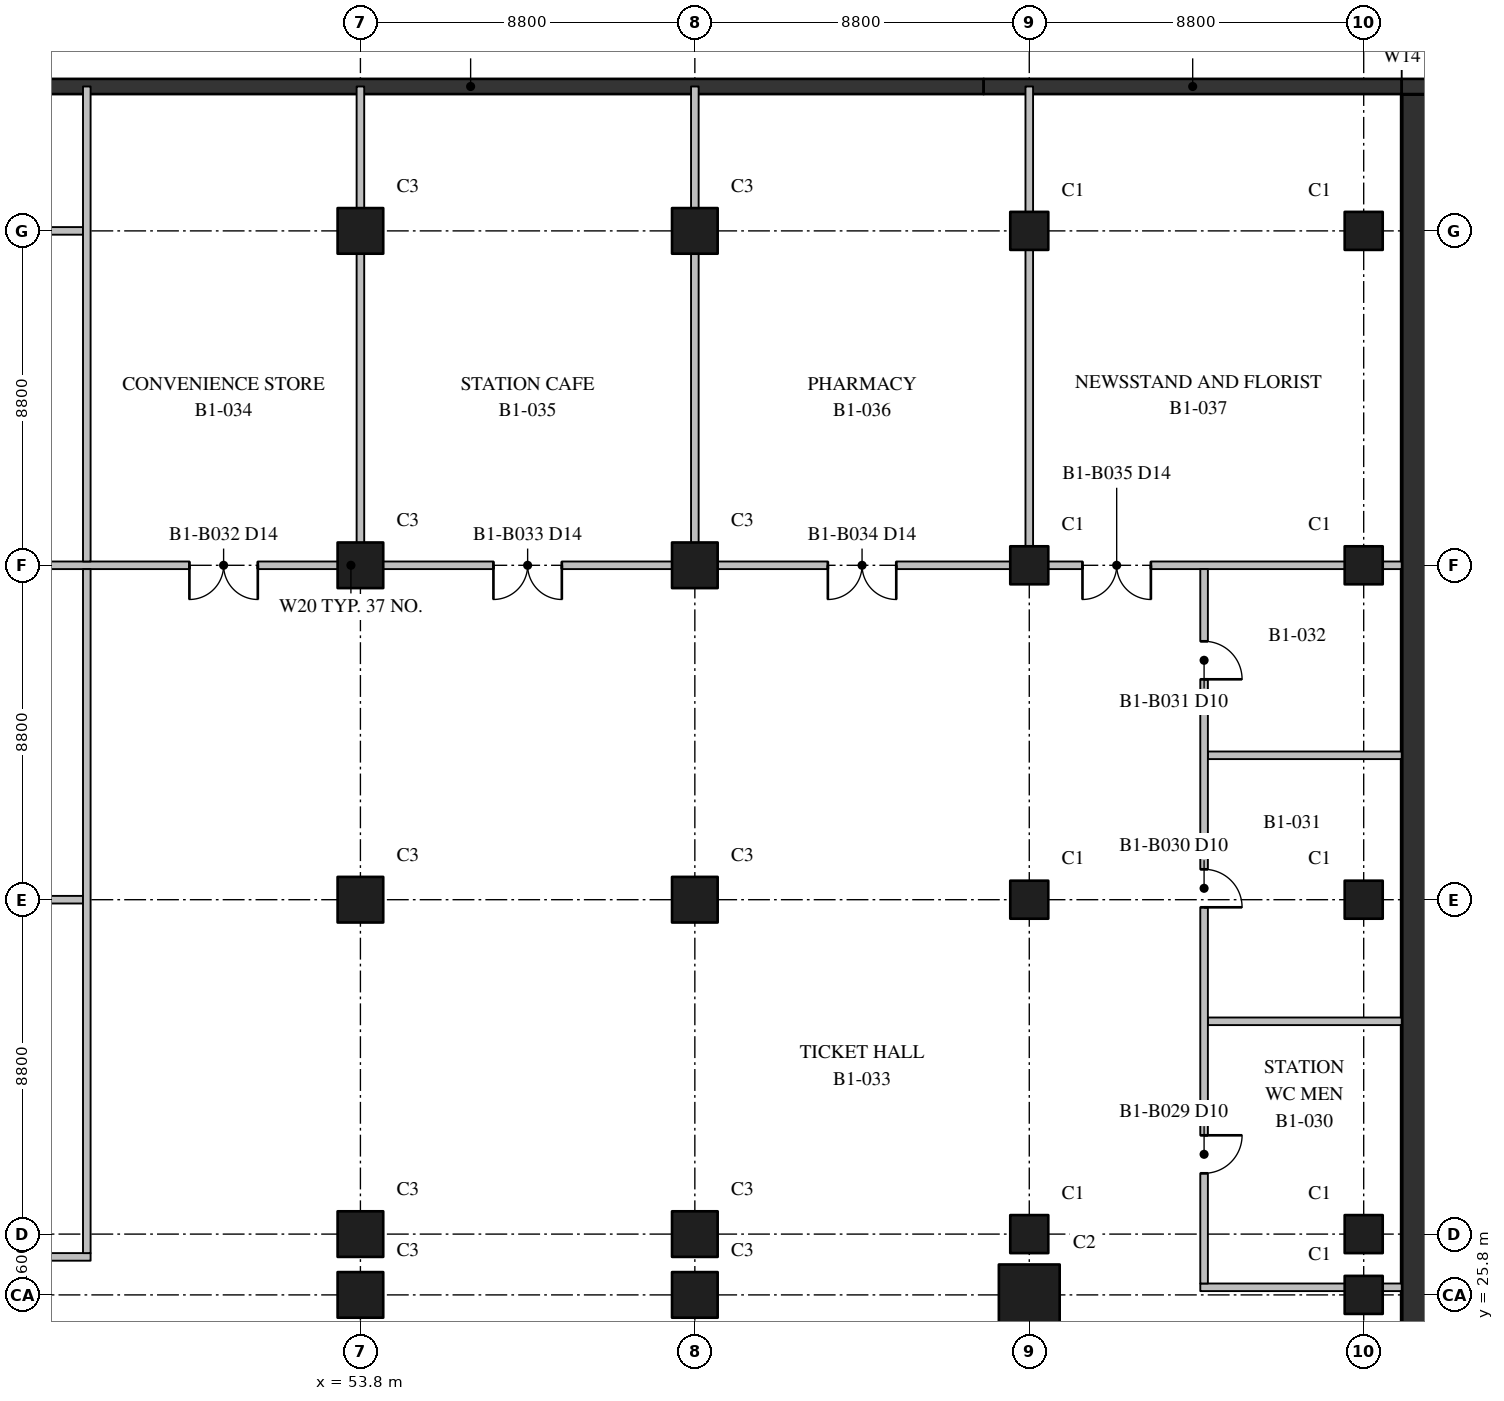
"""IFC4 building model, lengths in metres.
Left out: names, types, materials, properties, quantities, classifications, styles, units other than length and angle.
Written with IfcOpenShell. Run it as: python <this file> out.ifc"""

import sys

from ifc_helpers import new_model, si_unit, direction, frame, frame_2d, origin, origin_2d, place, context, subcontext, project, spatial, polyline, rectangle, outline, extrude, element, fill, save


model = new_model("IFC4")
c1 = context("Model", 3, precision=1e-05, world=origin(), true_north=direction((0.0, 1.0)))
c2 = subcontext(c1, "Body", "Model", "MODEL_VIEW")
j1 = project(units=[si_unit("LENGTHUNIT", "METRE"), si_unit("PLANEANGLEUNIT", "RADIAN")], contexts=[c1])
p1 = place(None, origin())
s1 = spatial("IfcSite", under=j1, at=p1, CompositionType="ELEMENT")
p2 = place(p1, origin())
s2 = spatial("IfcBuilding", under=s1, at=p2, CompositionType="ELEMENT")
p3 = place(p2, frame((0.0, 0.0, -7.0)))
s3 = spatial("IfcBuildingStorey", under=s2, at=p3, CompositionType="ELEMENT", Elevation=-7.0)
for number, where, z_axis, x_axis in (
    (1, (53.8, 25.8, 0.0), (0.0, 0.0, 1.0), (1.0, 0.0, 0.0)),
    (2, (53.8, 27.4, 0.0), (0.0, 0.0, 1.0), (1.0, 0.0, 0.0)),
    (3, (53.8, 36.2, 0.0), (0.0, 0.0, 1.0), (1.0, 0.0, 0.0)),
    (4, (53.8, 45.0, 0.0), (0.0, 0.0, 1.0), (1.0, 0.0, 0.0)),
    (5, (53.8, 53.8, 0.0), (0.0, 0.0, 1.0), (1.0, 0.0, 0.0)),
    (6, (62.6, 25.8, 0.0), (0.0, 0.0, 1.0), (1.0, 0.0, 0.0)),
    (7, (62.6, 27.4, 0.0), (0.0, 0.0, 1.0), (1.0, 0.0, 0.0)),
    (8, (62.6, 36.2, 0.0), (0.0, 0.0, 1.0), (1.0, 0.0, 0.0)),
    (9, (62.6, 45.0, 0.0), (0.0, 0.0, 1.0), (1.0, 0.0, 0.0)),
    (10, (62.6, 53.8, 0.0), (0.0, 0.0, 1.0), (1.0, 0.0, 0.0)),
):
    element("IfcColumn", number, at=place(p3, frame(where, z_axis=z_axis, x_axis=x_axis)), inside=s3, PredefinedType="COLUMN", context=c2, shape_type="SweptSolid", body=[
        extrude(rectangle(XDim=1.2, YDim=1.2, at=origin_2d()), origin(), (0.0, 0.0, 1.0), 7.0),
    ])
p4 = place(p3, frame((71.4, 25.8, 0.0), z_axis=(0.0, 0.0, 1.0), x_axis=(1.0, 0.0, 0.0)))
e11 = element("IfcColumn", 11, at=p4, inside=s3, PredefinedType="COLUMN", context=c2, shape_type="SweptSolid", body=[
    extrude(rectangle(XDim=1.6, YDim=1.6, at=origin_2d()), origin(), (0.0, 0.0, 1.0), 7.0),
])
for number, where, z_axis, x_axis in (
    (12, (71.4, 27.4, 0.0), (0.0, 0.0, 1.0), (1.0, 0.0, 0.0)),
    (13, (71.4, 36.2, 0.0), (0.0, 0.0, 1.0), (1.0, 0.0, 0.0)),
    (14, (71.4, 45.0, 0.0), (0.0, 0.0, 1.0), (1.0, 0.0, 0.0)),
    (15, (71.4, 53.8, 0.0), (0.0, 0.0, 1.0), (1.0, 0.0, 0.0)),
    (16, (80.2, 25.8, 0.0), (0.0, 0.0, 1.0), (1.0, 0.0, 0.0)),
    (17, (80.2, 27.4, 0.0), (0.0, 0.0, 1.0), (1.0, 0.0, 0.0)),
    (18, (80.2, 36.2, 0.0), (0.0, 0.0, 1.0), (1.0, 0.0, 0.0)),
    (19, (80.2, 45.0, 0.0), (0.0, 0.0, 1.0), (1.0, 0.0, 0.0)),
    (20, (80.2, 53.8, 0.0), (0.0, 0.0, 1.0), (1.0, 0.0, 0.0)),
):
    element("IfcColumn", number, at=place(p3, frame(where, z_axis=z_axis, x_axis=x_axis)), inside=s3, PredefinedType="COLUMN", context=c2, shape_type="SweptSolid", body=[
        extrude(rectangle(XDim=1.0, YDim=1.0, at=origin_2d()), origin(), (0.0, 0.0, 1.0), 7.0),
    ])
p5 = place(p3, frame((43.2, 57.6, 0.0), z_axis=(0.0, 0.0, 1.0), x_axis=(1.0, 0.0, 0.0)))
e21 = element("IfcWall", 21, at=p5, inside=s3, PredefinedType="SHEAR", context=c2, shape_type="SweptSolid", body=[
    extrude(outline(polyline([(0.0, 0.0), (27.0, 0.0), (27.0, 4.15), (24.3, 3.7), (21.6, 3.25), (18.9, 2.8), (16.2, 2.35), (13.5, 1.9), (10.8, 1.45), (8.1, 1.0), (5.4, 0.55), (2.7, 0.1), (0.0, 0.05), (0.0, 0.0)])), frame((0.0, 0.2, 0.0), z_axis=(0.0, -1.0, 0.0), x_axis=(1.0, 0.0, 0.0)), (0.0, 0.0, 1.0), 0.4),
])
p6 = place(p3, frame((70.2, 57.6, 0.0), z_axis=(0.0, 0.0, 1.0), x_axis=(1.0, 0.0, 0.0)))
e22 = element("IfcWall", 22, at=p6, inside=s3, PredefinedType="SHEAR", context=c2, shape_type="SweptSolid", body=[
    extrude(outline(polyline([(0.0, 0.0), (11.0, 0.0), (11.0, 8.1), (8.25, 8.1), (5.5, 8.1), (2.75, 8.1), (0.0, 8.1), (0.0, 0.0)])), frame((0.0, 0.2, 0.0), z_axis=(0.0, -1.0, 0.0), x_axis=(1.0, 0.0, 0.0)), (0.0, 0.0, 1.0), 0.4),
])
p7 = place(p3, frame((81.2, 57.6, 5.2), z_axis=(0.0, 0.0, 1.0), x_axis=(1.0, 0.0, 0.0)))
e23 = element("IfcWall", 23, at=p7, inside=s3, PredefinedType="SHEAR", context=c2, shape_type="SweptSolid", body=[
    extrude(outline(polyline([(0.0, 0.0), (4.0, 0.0), (4.0, 2.9), (2.0, 2.9), (0.0, 2.9), (0.0, 0.0)])), frame((0.0, 0.2, 0.0), z_axis=(0.0, -1.0, 0.0), x_axis=(1.0, 0.0, 0.0)), (0.0, 0.0, 1.0), 0.4),
])
p8 = place(p3, frame((81.6, 57.4, 0.0), z_axis=(0.0, 0.0, 1.0), x_axis=(0.0, -1.0, 0.0)))
e24 = element("IfcWall", 24, at=p8, inside=s3, PredefinedType="SHEAR", context=c2, shape_type="SweptSolid", body=[
    extrude(rectangle(XDim=55.6, YDim=0.8, at=frame_2d((27.8, 0.0))), origin(), (0.0, 0.0, 1.0), 7.0),
])
p9 = place(p3, frame((76.1, 33.0, 0.0), z_axis=(0.0, 0.0, 1.0), x_axis=(1.0, 0.0, 0.0)))
e25 = element("IfcWall", 25, at=p9, inside=s3, PredefinedType="PARTITIONING", context=c2, shape_type="SweptSolid", body=[
    extrude(rectangle(XDim=5.1, YDim=0.2, at=frame_2d((2.55, 0.0))), origin(), (0.0, 0.0, 1.0), 6.5),
])
p10 = place(p3, frame((75.9, 26.0, 0.0), z_axis=(0.0, 0.0, 1.0), x_axis=(1.0, 0.0, 0.0)))
e26 = element("IfcWall", 26, at=p10, inside=s3, PredefinedType="PARTITIONING", context=c2, shape_type="SweptSolid", body=[
    extrude(rectangle(XDim=5.3, YDim=0.2, at=frame_2d((2.65, 0.0))), origin(), (0.0, 0.0, 1.0), 6.5),
])
p11 = place(p3, frame((76.1, 40.0, 0.0), z_axis=(0.0, 0.0, 1.0), x_axis=(1.0, 0.0, 0.0)))
e27 = element("IfcWall", 27, at=p11, inside=s3, PredefinedType="PARTITIONING", context=c2, shape_type="SweptSolid", body=[
    extrude(rectangle(XDim=5.1, YDim=0.2, at=frame_2d((2.55, 0.0))), origin(), (0.0, 0.0, 1.0), 6.5),
])
p12 = place(p3, frame((25.9, 45.0, 0.0), z_axis=(0.0, 0.0, 1.0), x_axis=(1.0, 0.0, 0.0)))
e28 = element("IfcWall", 28, at=p12, inside=s3, PredefinedType="PARTITIONING", context=c2, shape_type="SweptSolid", body=[
    extrude(rectangle(XDim=55.3, YDim=0.2, at=frame_2d((27.65, 0.0))), origin(), (0.0, 0.0, 1.0), 6.5),
])
p13 = place(p12, frame((23.4, 0.0, 0.0)))
e29 = element("IfcOpeningElement", 29, at=p13, cuts=e28, PredefinedType="OPENING", context=c2, shape_type="SweptSolid", body=[
    extrude(rectangle(XDim=1.8, YDim=2.4, at=frame_2d((0.9, 1.2))), frame((0.0, 0.11, 0.0), z_axis=(0.0, -1.0, 0.0), x_axis=(1.0, 0.0, 0.0)), (0.0, 0.0, 1.0), 0.22),
])
p14 = place(p12, frame((31.4, 0.0, 0.0)))
e30 = element("IfcOpeningElement", 30, at=p14, cuts=e28, PredefinedType="OPENING", context=c2, shape_type="SweptSolid", body=[
    extrude(rectangle(XDim=1.8, YDim=2.4, at=frame_2d((0.9, 1.2))), frame((0.0, 0.11, 0.0), z_axis=(0.0, -1.0, 0.0), x_axis=(1.0, 0.0, 0.0)), (0.0, 0.0, 1.0), 0.22),
])
p15 = place(p12, frame((40.2, 0.0, 0.0)))
e31 = element("IfcOpeningElement", 31, at=p15, cuts=e28, PredefinedType="OPENING", context=c2, shape_type="SweptSolid", body=[
    extrude(rectangle(XDim=1.8, YDim=2.4, at=frame_2d((0.9, 1.2))), frame((0.0, 0.11, 0.0), z_axis=(0.0, -1.0, 0.0), x_axis=(1.0, 0.0, 0.0)), (0.0, 0.0, 1.0), 0.22),
])
p16 = place(p12, frame((46.9, 0.0, 0.0)))
e32 = element("IfcOpeningElement", 32, at=p16, cuts=e28, PredefinedType="OPENING", context=c2, shape_type="SweptSolid", body=[
    extrude(rectangle(XDim=1.8, YDim=2.4, at=frame_2d((0.9, 1.2))), frame((0.0, 0.11, 0.0), z_axis=(0.0, -1.0, 0.0), x_axis=(1.0, 0.0, 0.0)), (0.0, 0.0, 1.0), 0.22),
])
p17 = place(p3, frame((25.9, 26.8, 0.0), z_axis=(0.0, 0.0, 1.0), x_axis=(1.0, 0.0, 0.0)))
e33 = element("IfcWall", 33, at=p17, inside=s3, PredefinedType="PARTITIONING", context=c2, shape_type="SweptSolid", body=[
    extrude(rectangle(XDim=20.8, YDim=0.2, at=frame_2d((10.4, 0.0))), origin(), (0.0, 0.0, 1.0), 6.5),
])
for number, where, z_axis, x_axis in (
    (34, (25.9, 36.2, 0.0), (0.0, 0.0, 1.0), (1.0, 0.0, 0.0)),
    (35, (25.9, 53.8, 0.0), (0.0, 0.0, 1.0), (1.0, 0.0, 0.0)),
):
    element("IfcWall", number, at=place(p3, frame(where, z_axis=z_axis, x_axis=x_axis)), inside=s3, PredefinedType="PARTITIONING", context=c2, shape_type="SweptSolid", body=[
        extrude(rectangle(XDim=20.6, YDim=0.2, at=frame_2d((10.3, 0.0))), origin(), (0.0, 0.0, 1.0), 6.5),
    ])
p18 = place(p3, frame((76.0, 26.1, 0.0), z_axis=(0.0, 0.0, 1.0), x_axis=(0.0, 1.0, 0.0)))
e36 = element("IfcWall", 36, at=p18, inside=s3, PredefinedType="PARTITIONING", context=c2, shape_type="SweptSolid", body=[
    extrude(rectangle(XDim=18.8, YDim=0.2, at=frame_2d((9.4, 0.0))), origin(), (0.0, 0.0, 1.0), 6.5),
])
p19 = place(p18, frame((2.9, 0.0, 0.0)))
e37 = element("IfcOpeningElement", 37, at=p19, cuts=e36, PredefinedType="OPENING", context=c2, shape_type="SweptSolid", body=[
    extrude(rectangle(XDim=1.0, YDim=2.1, at=frame_2d((0.5, 1.05))), frame((0.0, 0.11, 0.0), z_axis=(0.0, -1.0, 0.0), x_axis=(1.0, 0.0, 0.0)), (0.0, 0.0, 1.0), 0.22),
])
p20 = place(p18, frame((9.9, 0.0, 0.0)))
e38 = element("IfcOpeningElement", 38, at=p20, cuts=e36, PredefinedType="OPENING", context=c2, shape_type="SweptSolid", body=[
    extrude(rectangle(XDim=1.0, YDim=2.1, at=frame_2d((0.5, 1.05))), frame((0.0, 0.11, 0.0), z_axis=(0.0, -1.0, 0.0), x_axis=(1.0, 0.0, 0.0)), (0.0, 0.0, 1.0), 0.22),
])
p21 = place(p18, frame((15.9, 0.0, 0.0)))
e39 = element("IfcOpeningElement", 39, at=p21, cuts=e36, PredefinedType="OPENING", context=c2, shape_type="SweptSolid", body=[
    extrude(rectangle(XDim=1.0, YDim=2.1, at=frame_2d((0.5, 1.05))), frame((0.0, 0.11, 0.0), z_axis=(0.0, -1.0, 0.0), x_axis=(1.0, 0.0, 0.0)), (0.0, 0.0, 1.0), 0.22),
])
p22 = place(p3, frame((46.6, 26.9, 0.0), z_axis=(0.0, 0.0, 1.0), x_axis=(0.0, 1.0, 0.0)))
e40 = element("IfcWall", 40, at=p22, inside=s3, PredefinedType="PARTITIONING", context=c2, shape_type="SweptSolid", body=[
    extrude(rectangle(XDim=18.0, YDim=0.2, at=frame_2d((9.0, 0.0))), origin(), (0.0, 0.0, 1.0), 6.5),
])
for number, where, z_axis, x_axis in (
    (41, (46.6, 45.1, 0.0), (0.0, 0.0, 1.0), (0.0, 1.0, 0.0)),
    (42, (53.8, 45.1, 0.0), (0.0, 0.0, 1.0), (0.0, 1.0, 0.0)),
    (43, (62.6, 45.1, 0.0), (0.0, 0.0, 1.0), (0.0, 1.0, 0.0)),
    (44, (71.4, 45.1, 0.0), (0.0, 0.0, 1.0), (0.0, 1.0, 0.0)),
):
    element("IfcWall", number, at=place(p3, frame(where, z_axis=z_axis, x_axis=x_axis)), inside=s3, PredefinedType="PARTITIONING", context=c2, shape_type="SweptSolid", body=[
        extrude(rectangle(XDim=12.5, YDim=0.2, at=frame_2d((6.25, 0.0))), origin(), (0.0, 0.0, 1.0), 6.5),
    ])
p23 = place(p19, frame((1.0, 0.0, 0.0), z_axis=(0.0, 0.0, 1.0), x_axis=(-1.0, 0.0, 0.0)))
e45 = element("IfcDoor", 45, at=p23, inside=s3, OperationType="SINGLE_SWING_RIGHT", PredefinedType="DOOR", context=c2, shape_type="SweptSolid", body=[
    extrude(rectangle(XDim=1.0, YDim=2.1, at=frame_2d((0.5, 1.05))), frame((0.0, 0.025, 0.0), z_axis=(0.0, -1.0, 0.0), x_axis=(1.0, 0.0, 0.0)), (0.0, 0.0, 1.0), 0.05),
])
fill(e37, e45)
p24 = place(p20, frame((1.0, 0.0, 0.0), z_axis=(0.0, 0.0, 1.0), x_axis=(-1.0, 0.0, 0.0)))
e46 = element("IfcDoor", 46, at=p24, inside=s3, OperationType="SINGLE_SWING_LEFT", PredefinedType="DOOR", context=c2, shape_type="SweptSolid", body=[
    extrude(rectangle(XDim=1.0, YDim=2.1, at=frame_2d((0.5, 1.05))), frame((0.0, 0.025, 0.0), z_axis=(0.0, -1.0, 0.0), x_axis=(1.0, 0.0, 0.0)), (0.0, 0.0, 1.0), 0.05),
])
fill(e38, e46)
p25 = place(p21, frame((1.0, 0.0, 0.0), z_axis=(0.0, 0.0, 1.0), x_axis=(-1.0, 0.0, 0.0)))
e47 = element("IfcDoor", 47, at=p25, inside=s3, OperationType="SINGLE_SWING_LEFT", PredefinedType="DOOR", context=c2, shape_type="SweptSolid", body=[
    extrude(rectangle(XDim=1.0, YDim=2.1, at=frame_2d((0.5, 1.05))), frame((0.0, 0.025, 0.0), z_axis=(0.0, -1.0, 0.0), x_axis=(1.0, 0.0, 0.0)), (0.0, 0.0, 1.0), 0.05),
])
fill(e39, e47)
p26 = place(p13, frame((1.8, 0.0, 0.0), z_axis=(0.0, 0.0, 1.0), x_axis=(-1.0, 0.0, 0.0)))
e48 = element("IfcDoor", 48, at=p26, inside=s3, OperationType="DOUBLE_DOOR_SINGLE_SWING", PredefinedType="DOOR", context=c2, shape_type="SweptSolid", body=[
    extrude(rectangle(XDim=1.8, YDim=2.4, at=frame_2d((0.9, 1.2))), frame((0.0, 0.025, 0.0), z_axis=(0.0, -1.0, 0.0), x_axis=(1.0, 0.0, 0.0)), (0.0, 0.0, 1.0), 0.05),
])
fill(e29, e48)
p27 = place(p14, frame((1.8, 0.0, 0.0), z_axis=(0.0, 0.0, 1.0), x_axis=(-1.0, 0.0, 0.0)))
e49 = element("IfcDoor", 49, at=p27, inside=s3, OperationType="DOUBLE_DOOR_SINGLE_SWING", PredefinedType="DOOR", context=c2, shape_type="SweptSolid", body=[
    extrude(rectangle(XDim=1.8, YDim=2.4, at=frame_2d((0.9, 1.2))), frame((0.0, 0.025, 0.0), z_axis=(0.0, -1.0, 0.0), x_axis=(1.0, 0.0, 0.0)), (0.0, 0.0, 1.0), 0.05),
])
fill(e30, e49)
p28 = place(p15, frame((1.8, 0.0, 0.0), z_axis=(0.0, 0.0, 1.0), x_axis=(-1.0, 0.0, 0.0)))
e50 = element("IfcDoor", 50, at=p28, inside=s3, OperationType="DOUBLE_DOOR_SINGLE_SWING", PredefinedType="DOOR", context=c2, shape_type="SweptSolid", body=[
    extrude(rectangle(XDim=1.8, YDim=2.4, at=frame_2d((0.9, 1.2))), frame((0.0, 0.025, 0.0), z_axis=(0.0, -1.0, 0.0), x_axis=(1.0, 0.0, 0.0)), (0.0, 0.0, 1.0), 0.05),
])
fill(e31, e50)
p29 = place(p16, frame((1.8, 0.0, 0.0), z_axis=(0.0, 0.0, 1.0), x_axis=(-1.0, 0.0, 0.0)))
e51 = element("IfcDoor", 51, at=p29, inside=s3, OperationType="DOUBLE_DOOR_SINGLE_SWING", PredefinedType="DOOR", context=c2, shape_type="SweptSolid", body=[
    extrude(rectangle(XDim=1.8, YDim=2.4, at=frame_2d((0.9, 1.2))), frame((0.0, 0.025, 0.0), z_axis=(0.0, -1.0, 0.0), x_axis=(1.0, 0.0, 0.0)), (0.0, 0.0, 1.0), 0.05),
])
fill(e32, e51)
save(model, sys.argv[1])
